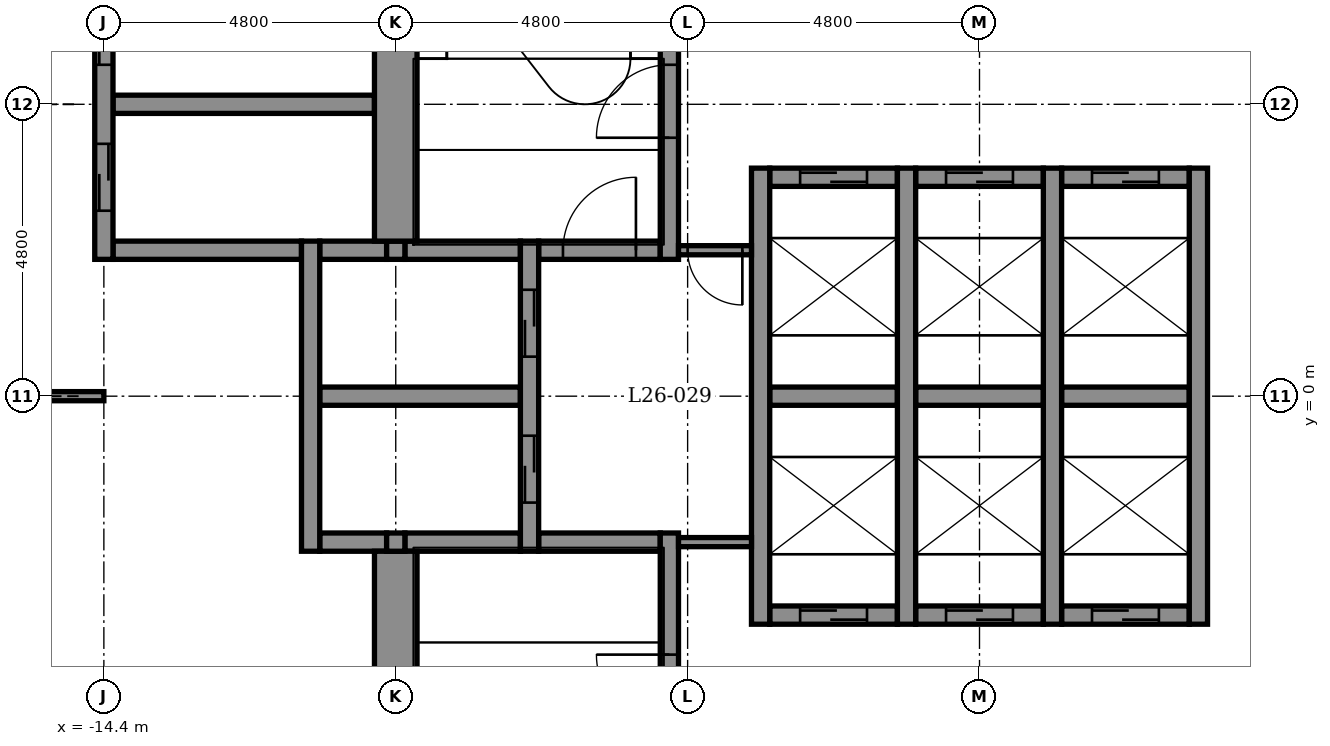
"""IFC4 building model, lengths in metres.
Left out: names, types, materials, properties, quantities, classifications, styles, units other than length and angle.
Written with IfcOpenShell. Run it as: python <this file> out.ifc"""

import sys

from ifc_helpers import new_model, si_unit, direction, frame, frame_2d, origin, place, context, subcontext, project, spatial, rectangle, extrude, element, fill, save


model = new_model("IFC4")
c1 = context("Model", 3, precision=1e-05, world=origin(), true_north=direction((0.0, 1.0)))
c2 = subcontext(c1, "Body", "Model", "MODEL_VIEW")
j1 = project(units=[si_unit("LENGTHUNIT", "METRE"), si_unit("PLANEANGLEUNIT", "RADIAN")], contexts=[c1])
p1 = place(None, origin())
s1 = spatial("IfcSite", under=j1, at=p1, CompositionType="ELEMENT")
p2 = place(p1, origin())
s2 = spatial("IfcBuilding", under=s1, at=p2, CompositionType="ELEMENT")
p3 = place(p2, frame((0.0, 0.0, 133.4)))
s3 = spatial("IfcBuildingStorey", under=s2, at=p3, CompositionType="ELEMENT", Elevation=133.4)
p4 = place(p3, frame((-3.45, -3.6, -0.15), z_axis=(0.0, 0.0, 1.0), x_axis=(1.0, 0.0, 0.0)))
e1 = element("IfcWall", 1, at=p4, inside=s3, PredefinedType="STANDARD", context=c2, shape_type="SweptSolid", body=[
    extrude(rectangle(XDim=2.1, YDim=0.3, at=frame_2d((1.05, 0.0))), origin(), (0.0, 0.0, 1.0), 5.4),
])
p5 = place(p4, frame((0.5, 0.0, 0.15)))
e2 = element("IfcOpeningElement", 2, at=p5, cuts=e1, PredefinedType="OPENING", context=c2, shape_type="SweptSolid", body=[
    extrude(rectangle(XDim=1.1, YDim=2.1, at=frame_2d((0.55, 1.05))), frame((0.0, 0.16, 0.0), z_axis=(0.0, -1.0, 0.0), x_axis=(1.0, 0.0, 0.0)), (0.0, 0.0, 1.0), 0.32),
])
p6 = place(p3, frame((-1.05, -3.6, -0.15), z_axis=(0.0, 0.0, 1.0), x_axis=(1.0, 0.0, 0.0)))
e3 = element("IfcWall", 3, at=p6, inside=s3, PredefinedType="STANDARD", context=c2, shape_type="SweptSolid", body=[
    extrude(rectangle(XDim=2.1, YDim=0.3, at=frame_2d((1.05, 0.0))), origin(), (0.0, 0.0, 1.0), 5.4),
])
p7 = place(p6, frame((0.5, 0.0, 0.15)))
e4 = element("IfcOpeningElement", 4, at=p7, cuts=e3, PredefinedType="OPENING", context=c2, shape_type="SweptSolid", body=[
    extrude(rectangle(XDim=1.1, YDim=2.1, at=frame_2d((0.55, 1.05))), frame((0.0, 0.16, 0.0), z_axis=(0.0, -1.0, 0.0), x_axis=(1.0, 0.0, 0.0)), (0.0, 0.0, 1.0), 0.32),
])
p8 = place(p3, frame((1.35, -3.6, -0.15), z_axis=(0.0, 0.0, 1.0), x_axis=(1.0, 0.0, 0.0)))
e5 = element("IfcWall", 5, at=p8, inside=s3, PredefinedType="STANDARD", context=c2, shape_type="SweptSolid", body=[
    extrude(rectangle(XDim=2.1, YDim=0.3, at=frame_2d((1.05, 0.0))), origin(), (0.0, 0.0, 1.0), 5.4),
])
p9 = place(p8, frame((0.5, 0.0, 0.15)))
e6 = element("IfcOpeningElement", 6, at=p9, cuts=e5, PredefinedType="OPENING", context=c2, shape_type="SweptSolid", body=[
    extrude(rectangle(XDim=1.1, YDim=2.1, at=frame_2d((0.55, 1.05))), frame((0.0, 0.16, 0.0), z_axis=(0.0, -1.0, 0.0), x_axis=(1.0, 0.0, 0.0)), (0.0, 0.0, 1.0), 0.32),
])
p10 = place(p3, frame((-10.85, -2.4, -0.15), z_axis=(0.0, 0.0, 1.0), x_axis=(1.0, 0.0, 0.0)))
e7 = element("IfcWall", 7, at=p10, inside=s3, PredefinedType="STANDARD", context=c2, shape_type="SweptSolid", body=[
    extrude(rectangle(XDim=1.1, YDim=0.3, at=frame_2d((0.55, 0.0))), origin(), (0.0, 0.0, 1.0), 5.4),
])
p11 = place(p3, frame((-9.45, -2.4, -0.15), z_axis=(0.0, 0.0, 1.0), x_axis=(1.0, 0.0, 0.0)))
e8 = element("IfcWall", 8, at=p11, inside=s3, PredefinedType="STANDARD", context=c2, shape_type="SweptSolid", body=[
    extrude(rectangle(XDim=1.9, YDim=0.3, at=frame_2d((0.95, 0.0))), origin(), (0.0, 0.0, 1.0), 5.4),
])
p12 = place(p3, frame((-7.25, -2.4, -0.15), z_axis=(0.0, 0.0, 1.0), x_axis=(1.0, 0.0, 0.0)))
e9 = element("IfcWall", 9, at=p12, inside=s3, PredefinedType="STANDARD", context=c2, shape_type="SweptSolid", body=[
    extrude(rectangle(XDim=2.0, YDim=0.3, at=frame_2d((1.0, 0.0))), origin(), (0.0, 0.0, 1.0), 5.4),
])
p13 = place(p3, frame((-10.85, 0.0, -0.15), z_axis=(0.0, 0.0, 1.0), x_axis=(1.0, 0.0, 0.0)))
e10 = element("IfcWall", 10, at=p13, inside=s3, PredefinedType="STANDARD", context=c2, shape_type="SweptSolid", body=[
    extrude(rectangle(XDim=3.3, YDim=0.3, at=frame_2d((1.65, 0.0))), origin(), (0.0, 0.0, 1.0), 5.4),
])
p14 = place(p3, frame((-3.45, 0.0, -0.15), z_axis=(0.0, 0.0, 1.0), x_axis=(1.0, 0.0, 0.0)))
e11 = element("IfcWall", 11, at=p14, inside=s3, PredefinedType="STANDARD", context=c2, shape_type="SweptSolid", body=[
    extrude(rectangle(XDim=2.1, YDim=0.3, at=frame_2d((1.05, 0.0))), origin(), (0.0, 0.0, 1.0), 5.4),
])
p15 = place(p3, frame((-1.05, 0.0, -0.15), z_axis=(0.0, 0.0, 1.0), x_axis=(1.0, 0.0, 0.0)))
e12 = element("IfcWall", 12, at=p15, inside=s3, PredefinedType="STANDARD", context=c2, shape_type="SweptSolid", body=[
    extrude(rectangle(XDim=2.1, YDim=0.3, at=frame_2d((1.05, 0.0))), origin(), (0.0, 0.0, 1.0), 5.4),
])
p16 = place(p3, frame((1.35, 0.0, -0.15), z_axis=(0.0, 0.0, 1.0), x_axis=(1.0, 0.0, 0.0)))
e13 = element("IfcWall", 13, at=p16, inside=s3, PredefinedType="STANDARD", context=c2, shape_type="SweptSolid", body=[
    extrude(rectangle(XDim=2.1, YDim=0.3, at=frame_2d((1.05, 0.0))), origin(), (0.0, 0.0, 1.0), 5.4),
])
p17 = place(p3, frame((-14.25, 2.4, -0.15), z_axis=(0.0, 0.0, 1.0), x_axis=(1.0, 0.0, 0.0)))
e14 = element("IfcWall", 14, at=p17, inside=s3, PredefinedType="STANDARD", context=c2, shape_type="SweptSolid", body=[
    extrude(rectangle(XDim=3.1, YDim=0.3, at=frame_2d((1.55, 0.0))), origin(), (0.0, 0.0, 1.0), 4.55),
])
p18 = place(p3, frame((-10.85, 2.4, -0.15), z_axis=(0.0, 0.0, 1.0), x_axis=(1.0, 0.0, 0.0)))
e15 = element("IfcWall", 15, at=p18, inside=s3, PredefinedType="STANDARD", context=c2, shape_type="SweptSolid", body=[
    extrude(rectangle(XDim=1.1, YDim=0.3, at=frame_2d((0.55, 0.0))), origin(), (0.0, 0.0, 1.0), 5.4),
])
p19 = place(p3, frame((-9.45, 2.4, -0.15), z_axis=(0.0, 0.0, 1.0), x_axis=(1.0, 0.0, 0.0)))
e16 = element("IfcWall", 16, at=p19, inside=s3, PredefinedType="STANDARD", context=c2, shape_type="SweptSolid", body=[
    extrude(rectangle(XDim=1.9, YDim=0.3, at=frame_2d((0.95, 0.0))), origin(), (0.0, 0.0, 1.0), 5.4),
])
p20 = place(p3, frame((-7.25, 2.4, -0.15), z_axis=(0.0, 0.0, 1.0), x_axis=(1.0, 0.0, 0.0)))
e17 = element("IfcWall", 17, at=p20, inside=s3, PredefinedType="STANDARD", context=c2, shape_type="SweptSolid", body=[
    extrude(rectangle(XDim=2.0, YDim=0.3, at=frame_2d((1.0, 0.0))), origin(), (0.0, 0.0, 1.0), 5.4),
])
p21 = place(p20, frame((0.4, 0.0, 0.15)))
e18 = element("IfcOpeningElement", 18, at=p21, cuts=e17, PredefinedType="OPENING", context=c2, shape_type="SweptSolid", body=[
    extrude(rectangle(XDim=1.2, YDim=2.1, at=frame_2d((0.6, 1.05))), frame((0.0, 0.16, 0.0), z_axis=(0.0, -1.0, 0.0), x_axis=(1.0, 0.0, 0.0)), (0.0, 0.0, 1.0), 0.32),
])
p22 = place(p3, frame((-3.45, 3.6, -0.15), z_axis=(0.0, 0.0, 1.0), x_axis=(1.0, 0.0, 0.0)))
e19 = element("IfcWall", 19, at=p22, inside=s3, PredefinedType="STANDARD", context=c2, shape_type="SweptSolid", body=[
    extrude(rectangle(XDim=2.1, YDim=0.3, at=frame_2d((1.05, 0.0))), origin(), (0.0, 0.0, 1.0), 5.4),
])
p23 = place(p22, frame((0.5, 0.0, 0.15)))
e20 = element("IfcOpeningElement", 20, at=p23, cuts=e19, PredefinedType="OPENING", context=c2, shape_type="SweptSolid", body=[
    extrude(rectangle(XDim=1.1, YDim=2.1, at=frame_2d((0.55, 1.05))), frame((0.0, 0.16, 0.0), z_axis=(0.0, -1.0, 0.0), x_axis=(1.0, 0.0, 0.0)), (0.0, 0.0, 1.0), 0.32),
])
p24 = place(p3, frame((-1.05, 3.6, -0.15), z_axis=(0.0, 0.0, 1.0), x_axis=(1.0, 0.0, 0.0)))
e21 = element("IfcWall", 21, at=p24, inside=s3, PredefinedType="STANDARD", context=c2, shape_type="SweptSolid", body=[
    extrude(rectangle(XDim=2.1, YDim=0.3, at=frame_2d((1.05, 0.0))), origin(), (0.0, 0.0, 1.0), 5.4),
])
p25 = place(p24, frame((0.5, 0.0, 0.15)))
e22 = element("IfcOpeningElement", 22, at=p25, cuts=e21, PredefinedType="OPENING", context=c2, shape_type="SweptSolid", body=[
    extrude(rectangle(XDim=1.1, YDim=2.1, at=frame_2d((0.55, 1.05))), frame((0.0, 0.16, 0.0), z_axis=(0.0, -1.0, 0.0), x_axis=(1.0, 0.0, 0.0)), (0.0, 0.0, 1.0), 0.32),
])
p26 = place(p3, frame((1.35, 3.6, -0.15), z_axis=(0.0, 0.0, 1.0), x_axis=(1.0, 0.0, 0.0)))
e23 = element("IfcWall", 23, at=p26, inside=s3, PredefinedType="STANDARD", context=c2, shape_type="SweptSolid", body=[
    extrude(rectangle(XDim=2.1, YDim=0.3, at=frame_2d((1.05, 0.0))), origin(), (0.0, 0.0, 1.0), 5.4),
])
p27 = place(p26, frame((0.5, 0.0, 0.15)))
e24 = element("IfcOpeningElement", 24, at=p27, cuts=e23, PredefinedType="OPENING", context=c2, shape_type="SweptSolid", body=[
    extrude(rectangle(XDim=1.1, YDim=2.1, at=frame_2d((0.55, 1.05))), frame((0.0, 0.16, 0.0), z_axis=(0.0, -1.0, 0.0), x_axis=(1.0, 0.0, 0.0)), (0.0, 0.0, 1.0), 0.32),
])
p28 = place(p3, frame((-14.25, 4.8, -0.15), z_axis=(0.0, 0.0, 1.0), x_axis=(1.0, 0.0, 0.0)))
e25 = element("IfcWall", 25, at=p28, inside=s3, PredefinedType="STANDARD", context=c2, shape_type="SweptSolid", body=[
    extrude(rectangle(XDim=4.3, YDim=0.3, at=frame_2d((2.15, 0.0))), origin(), (0.0, 0.0, 1.0), 4.55),
])
p29 = place(p3, frame((-14.4, 2.25, -0.15), z_axis=(0.0, 0.0, 1.0), x_axis=(0.0, 1.0, 0.0)))
e26 = element("IfcWall", 26, at=p29, inside=s3, PredefinedType="STANDARD", context=c2, shape_type="SweptSolid", body=[
    extrude(rectangle(XDim=5.1, YDim=0.3, at=frame_2d((2.55, 0.0))), origin(), (0.0, 0.0, 1.0), 4.55),
])
p30 = place(p29, frame((0.8, 0.0, 0.15)))
e27 = element("IfcOpeningElement", 27, at=p30, cuts=e26, PredefinedType="OPENING", context=c2, shape_type="SweptSolid", body=[
    extrude(rectangle(XDim=1.1, YDim=2.1, at=frame_2d((0.55, 1.05))), frame((0.0, 0.16, 0.0), z_axis=(0.0, -1.0, 0.0), x_axis=(1.0, 0.0, 0.0)), (0.0, 0.0, 1.0), 0.32),
])
p31 = place(p29, frame((3.2, 0.0, 0.15)))
e28 = element("IfcOpeningElement", 28, at=p31, cuts=e26, PredefinedType="OPENING", context=c2, shape_type="SweptSolid", body=[
    extrude(rectangle(XDim=1.1, YDim=2.1, at=frame_2d((0.55, 1.05))), frame((0.0, 0.16, 0.0), z_axis=(0.0, -1.0, 0.0), x_axis=(1.0, 0.0, 0.0)), (0.0, 0.0, 1.0), 0.32),
])
p32 = place(p3, frame((-11.0, -2.55, -0.15), z_axis=(0.0, 0.0, 1.0), x_axis=(0.0, 1.0, 0.0)))
e29 = element("IfcWall", 29, at=p32, inside=s3, PredefinedType="STANDARD", context=c2, shape_type="SweptSolid", body=[
    extrude(rectangle(XDim=5.1, YDim=0.3, at=frame_2d((2.55, 0.0))), origin(), (0.0, 0.0, 1.0), 5.4),
])
p33 = place(p3, frame((-9.6, -10.15, -0.15), z_axis=(0.0, 0.0, 1.0), x_axis=(0.0, 1.0, 0.0)))
e30 = element("IfcWall", 30, at=p33, inside=s3, PredefinedType="SHEAR", context=c2, shape_type="SweptSolid", body=[
    extrude(rectangle(XDim=7.6, YDim=0.7, at=frame_2d((3.8, 0.0))), origin(), (0.0, 0.0, 1.0), 5.4),
])
for number, where, z_axis, x_axis in (
    (31, (-9.6, -2.55, -0.15), (0.0, 0.0, 1.0), (0.0, 1.0, 0.0)),
    (32, (-9.6, 2.25, -0.15), (0.0, 0.0, 1.0), (0.0, 1.0, 0.0)),
):
    element("IfcWall", number, at=place(p3, frame(where, z_axis=z_axis, x_axis=x_axis)), inside=s3, PredefinedType="STANDARD", context=c2, shape_type="SweptSolid", body=[
        extrude(rectangle(XDim=0.3, YDim=0.3, at=frame_2d((0.15, 0.0))), origin(), (0.0, 0.0, 1.0), 5.4),
    ])
p34 = place(p3, frame((-9.6, 2.55, -0.15), z_axis=(0.0, 0.0, 1.0), x_axis=(0.0, 1.0, 0.0)))
e33 = element("IfcWall", 33, at=p34, inside=s3, PredefinedType="SHEAR", context=c2, shape_type="SweptSolid", body=[
    extrude(rectangle(XDim=7.6, YDim=0.7, at=frame_2d((3.8, 0.0))), origin(), (0.0, 0.0, 1.0), 5.4),
])
p35 = place(p3, frame((-7.4, -2.55, -0.15), z_axis=(0.0, 0.0, 1.0), x_axis=(0.0, 1.0, 0.0)))
e34 = element("IfcWall", 34, at=p35, inside=s3, PredefinedType="STANDARD", context=c2, shape_type="SweptSolid", body=[
    extrude(rectangle(XDim=5.1, YDim=0.3, at=frame_2d((2.55, 0.0))), origin(), (0.0, 0.0, 1.0), 5.4),
])
p36 = place(p35, frame((0.8, 0.0, 0.15)))
e35 = element("IfcOpeningElement", 35, at=p36, cuts=e34, PredefinedType="OPENING", context=c2, shape_type="SweptSolid", body=[
    extrude(rectangle(XDim=1.1, YDim=2.1, at=frame_2d((0.55, 1.05))), frame((0.0, 0.16, 0.0), z_axis=(0.0, -1.0, 0.0), x_axis=(1.0, 0.0, 0.0)), (0.0, 0.0, 1.0), 0.32),
])
p37 = place(p35, frame((3.2, 0.0, 0.15)))
e36 = element("IfcOpeningElement", 36, at=p37, cuts=e34, PredefinedType="OPENING", context=c2, shape_type="SweptSolid", body=[
    extrude(rectangle(XDim=1.1, YDim=2.1, at=frame_2d((0.55, 1.05))), frame((0.0, 0.16, 0.0), z_axis=(0.0, -1.0, 0.0), x_axis=(1.0, 0.0, 0.0)), (0.0, 0.0, 1.0), 0.32),
])
p38 = place(p3, frame((-5.1, -9.25, -0.15), z_axis=(0.0, 0.0, 1.0), x_axis=(0.0, 1.0, 0.0)))
e37 = element("IfcWall", 37, at=p38, inside=s3, PredefinedType="STANDARD", context=c2, shape_type="SweptSolid", body=[
    extrude(rectangle(XDim=7.0, YDim=0.3, at=frame_2d((3.5, 0.0))), origin(), (0.0, 0.0, 1.0), 5.4),
])
p39 = place(p38, frame((3.8, 0.0, 0.15)))
e38 = element("IfcOpeningElement", 38, at=p39, cuts=e37, PredefinedType="OPENING", context=c2, shape_type="SweptSolid", body=[
    extrude(rectangle(XDim=1.2, YDim=2.1, at=frame_2d((0.6, 1.05))), frame((0.0, 0.16, 0.0), z_axis=(0.0, -1.0, 0.0), x_axis=(1.0, 0.0, 0.0)), (0.0, 0.0, 1.0), 0.32),
])
p40 = place(p3, frame((-5.1, 2.25, -0.15), z_axis=(0.0, 0.0, 1.0), x_axis=(0.0, 1.0, 0.0)))
e39 = element("IfcWall", 39, at=p40, inside=s3, PredefinedType="STANDARD", context=c2, shape_type="SweptSolid", body=[
    extrude(rectangle(XDim=7.0, YDim=0.3, at=frame_2d((3.5, 0.0))), origin(), (0.0, 0.0, 1.0), 5.4),
])
p41 = place(p40, frame((2.0, 0.0, 0.15)))
e40 = element("IfcOpeningElement", 40, at=p41, cuts=e39, PredefinedType="OPENING", context=c2, shape_type="SweptSolid", body=[
    extrude(rectangle(XDim=1.2, YDim=2.1, at=frame_2d((0.6, 1.05))), frame((0.0, 0.16, 0.0), z_axis=(0.0, -1.0, 0.0), x_axis=(1.0, 0.0, 0.0)), (0.0, 0.0, 1.0), 0.32),
])
for number, where, z_axis, x_axis in (
    (41, (-3.6, -3.75, -0.15), (0.0, 0.0, 1.0), (0.0, 1.0, 0.0)),
    (42, (-1.2, -3.75, -0.15), (0.0, 0.0, 1.0), (0.0, 1.0, 0.0)),
    (43, (1.2, -3.75, -0.15), (0.0, 0.0, 1.0), (0.0, 1.0, 0.0)),
    (44, (3.6, -3.75, -0.15), (0.0, 0.0, 1.0), (0.0, 1.0, 0.0)),
):
    element("IfcWall", number, at=place(p3, frame(where, z_axis=z_axis, x_axis=x_axis)), inside=s3, PredefinedType="STANDARD", context=c2, shape_type="SweptSolid", body=[
        extrude(rectangle(XDim=7.5, YDim=0.3, at=frame_2d((3.75, 0.0))), origin(), (0.0, 0.0, 1.0), 5.4),
    ])
p42 = place(p3, frame((-19.2, 0.0, 0.0), z_axis=(0.0, 0.0, 1.0), x_axis=(1.0, 0.0, 0.0)))
e45 = element("IfcWall", 45, at=p42, inside=s3, PredefinedType="PARTITIONING", context=c2, shape_type="SweptSolid", body=[
    extrude(rectangle(XDim=4.8, YDim=0.15, at=frame_2d((2.4, 0.0))), origin(), (0.0, 0.0, 1.0), 4.41),
])
p43 = place(p3, frame((-4.95, 2.4, 0.0), z_axis=(0.0, 0.0, 1.0), x_axis=(1.0, 0.0, 0.0)))
e46 = element("IfcWall", 46, at=p43, inside=s3, PredefinedType="PARTITIONING", context=c2, shape_type="SweptSolid", body=[
    extrude(rectangle(XDim=1.2, YDim=0.15, at=frame_2d((0.6, 0.0))), origin(), (0.0, 0.0, 1.0), 5.25),
])
p44 = place(p43, frame((0.15, 0.0, 0.0)))
e47 = element("IfcOpeningElement", 47, at=p44, cuts=e46, PredefinedType="OPENING", context=c2, shape_type="SweptSolid", body=[
    extrude(rectangle(XDim=0.9, YDim=2.1, at=frame_2d((0.45, 1.05))), frame((0.0, 0.085, 0.0), z_axis=(0.0, -1.0, 0.0), x_axis=(1.0, 0.0, 0.0)), (0.0, 0.0, 1.0), 0.17),
])
p45 = place(p3, frame((-4.95, -2.4, 0.0), z_axis=(0.0, 0.0, 1.0), x_axis=(1.0, 0.0, 0.0)))
e48 = element("IfcWall", 48, at=p45, inside=s3, PredefinedType="PARTITIONING", context=c2, shape_type="SweptSolid", body=[
    extrude(rectangle(XDim=1.2, YDim=0.15, at=frame_2d((0.6, 0.0))), origin(), (0.0, 0.0, 1.0), 5.25),
])
p46 = place(p36, origin())
e49 = element("IfcDoor", 49, at=p46, inside=s3, OperationType="DOUBLE_DOOR_SLIDING", PredefinedType="DOOR", context=c2, shape_type="SweptSolid", body=[
    extrude(rectangle(XDim=1.1, YDim=2.1, at=frame_2d((0.55, 1.05))), frame((0.0, 0.025, 0.0), z_axis=(0.0, -1.0, 0.0), x_axis=(1.0, 0.0, 0.0)), (0.0, 0.0, 1.0), 0.05),
])
fill(e35, e49)
p47 = place(p37, origin())
e50 = element("IfcDoor", 50, at=p47, inside=s3, OperationType="DOUBLE_DOOR_SLIDING", PredefinedType="DOOR", context=c2, shape_type="SweptSolid", body=[
    extrude(rectangle(XDim=1.1, YDim=2.1, at=frame_2d((0.55, 1.05))), frame((0.0, 0.025, 0.0), z_axis=(0.0, -1.0, 0.0), x_axis=(1.0, 0.0, 0.0)), (0.0, 0.0, 1.0), 0.05),
])
fill(e36, e50)
p48 = place(p23, origin())
e51 = element("IfcDoor", 51, at=p48, inside=s3, OperationType="DOUBLE_DOOR_SLIDING", PredefinedType="DOOR", context=c2, shape_type="SweptSolid", body=[
    extrude(rectangle(XDim=1.1, YDim=2.1, at=frame_2d((0.55, 1.05))), frame((0.0, 0.025, 0.0), z_axis=(0.0, -1.0, 0.0), x_axis=(1.0, 0.0, 0.0)), (0.0, 0.0, 1.0), 0.05),
])
fill(e20, e51)
p49 = place(p25, origin())
e52 = element("IfcDoor", 52, at=p49, inside=s3, OperationType="DOUBLE_DOOR_SLIDING", PredefinedType="DOOR", context=c2, shape_type="SweptSolid", body=[
    extrude(rectangle(XDim=1.1, YDim=2.1, at=frame_2d((0.55, 1.05))), frame((0.0, 0.025, 0.0), z_axis=(0.0, -1.0, 0.0), x_axis=(1.0, 0.0, 0.0)), (0.0, 0.0, 1.0), 0.05),
])
fill(e22, e52)
p50 = place(p27, origin())
e53 = element("IfcDoor", 53, at=p50, inside=s3, OperationType="DOUBLE_DOOR_SLIDING", PredefinedType="DOOR", context=c2, shape_type="SweptSolid", body=[
    extrude(rectangle(XDim=1.1, YDim=2.1, at=frame_2d((0.55, 1.05))), frame((0.0, 0.025, 0.0), z_axis=(0.0, -1.0, 0.0), x_axis=(1.0, 0.0, 0.0)), (0.0, 0.0, 1.0), 0.05),
])
fill(e24, e53)
p51 = place(p5, origin())
e54 = element("IfcDoor", 54, at=p51, inside=s3, OperationType="DOUBLE_DOOR_SLIDING", PredefinedType="DOOR", context=c2, shape_type="SweptSolid", body=[
    extrude(rectangle(XDim=1.1, YDim=2.1, at=frame_2d((0.55, 1.05))), frame((0.0, 0.025, 0.0), z_axis=(0.0, -1.0, 0.0), x_axis=(1.0, 0.0, 0.0)), (0.0, 0.0, 1.0), 0.05),
])
fill(e2, e54)
p52 = place(p7, origin())
e55 = element("IfcDoor", 55, at=p52, inside=s3, OperationType="DOUBLE_DOOR_SLIDING", PredefinedType="DOOR", context=c2, shape_type="SweptSolid", body=[
    extrude(rectangle(XDim=1.1, YDim=2.1, at=frame_2d((0.55, 1.05))), frame((0.0, 0.025, 0.0), z_axis=(0.0, -1.0, 0.0), x_axis=(1.0, 0.0, 0.0)), (0.0, 0.0, 1.0), 0.05),
])
fill(e4, e55)
p53 = place(p9, origin())
e56 = element("IfcDoor", 56, at=p53, inside=s3, OperationType="DOUBLE_DOOR_SLIDING", PredefinedType="DOOR", context=c2, shape_type="SweptSolid", body=[
    extrude(rectangle(XDim=1.1, YDim=2.1, at=frame_2d((0.55, 1.05))), frame((0.0, 0.025, 0.0), z_axis=(0.0, -1.0, 0.0), x_axis=(1.0, 0.0, 0.0)), (0.0, 0.0, 1.0), 0.05),
])
fill(e6, e56)
p54 = place(p30, origin())
e57 = element("IfcDoor", 57, at=p54, inside=s3, OperationType="DOUBLE_DOOR_SLIDING", PredefinedType="DOOR", context=c2, shape_type="SweptSolid", body=[
    extrude(rectangle(XDim=1.1, YDim=2.1, at=frame_2d((0.55, 1.05))), frame((0.0, 0.025, 0.0), z_axis=(0.0, -1.0, 0.0), x_axis=(1.0, 0.0, 0.0)), (0.0, 0.0, 1.0), 0.05),
])
fill(e27, e57)
p55 = place(p31, origin())
e58 = element("IfcDoor", 58, at=p55, inside=s3, OperationType="DOUBLE_DOOR_SLIDING", PredefinedType="DOOR", context=c2, shape_type="SweptSolid", body=[
    extrude(rectangle(XDim=1.1, YDim=2.1, at=frame_2d((0.55, 1.05))), frame((0.0, 0.025, 0.0), z_axis=(0.0, -1.0, 0.0), x_axis=(1.0, 0.0, 0.0)), (0.0, 0.0, 1.0), 0.05),
])
fill(e28, e58)
p56 = place(p41, origin())
e59 = element("IfcDoor", 59, at=p56, inside=s3, OperationType="SINGLE_SWING_LEFT", PredefinedType="DOOR", context=c2, shape_type="SweptSolid", body=[
    extrude(rectangle(XDim=1.2, YDim=2.1, at=frame_2d((0.6, 1.05))), frame((0.0, 0.025, 0.0), z_axis=(0.0, -1.0, 0.0), x_axis=(1.0, 0.0, 0.0)), (0.0, 0.0, 1.0), 0.05),
])
fill(e40, e59)
p57 = place(p39, origin())
e60 = element("IfcDoor", 60, at=p57, inside=s3, OperationType="SINGLE_SWING_RIGHT", PredefinedType="DOOR", context=c2, shape_type="SweptSolid", body=[
    extrude(rectangle(XDim=1.2, YDim=2.1, at=frame_2d((0.6, 1.05))), frame((0.0, 0.025, 0.0), z_axis=(0.0, -1.0, 0.0), x_axis=(1.0, 0.0, 0.0)), (0.0, 0.0, 1.0), 0.05),
])
fill(e38, e60)
p58 = place(p44, frame((0.9, 0.0, 0.0), z_axis=(0.0, 0.0, 1.0), x_axis=(-1.0, 0.0, 0.0)))
e61 = element("IfcDoor", 61, at=p58, inside=s3, OperationType="SINGLE_SWING_RIGHT", PredefinedType="DOOR", context=c2, shape_type="SweptSolid", body=[
    extrude(rectangle(XDim=0.9, YDim=2.1, at=frame_2d((0.45, 1.05))), frame((0.0, 0.025, 0.0), z_axis=(0.0, -1.0, 0.0), x_axis=(1.0, 0.0, 0.0)), (0.0, 0.0, 1.0), 0.05),
])
fill(e47, e61)
p59 = place(p21, origin())
e62 = element("IfcDoor", 62, at=p59, inside=s3, OperationType="SINGLE_SWING_RIGHT", PredefinedType="DOOR", context=c2, shape_type="SweptSolid", body=[
    extrude(rectangle(XDim=1.2, YDim=2.1, at=frame_2d((0.6, 1.05))), frame((0.0, 0.025, 0.0), z_axis=(0.0, -1.0, 0.0), x_axis=(1.0, 0.0, 0.0)), (0.0, 0.0, 1.0), 0.05),
])
fill(e18, e62)
save(model, sys.argv[1])
